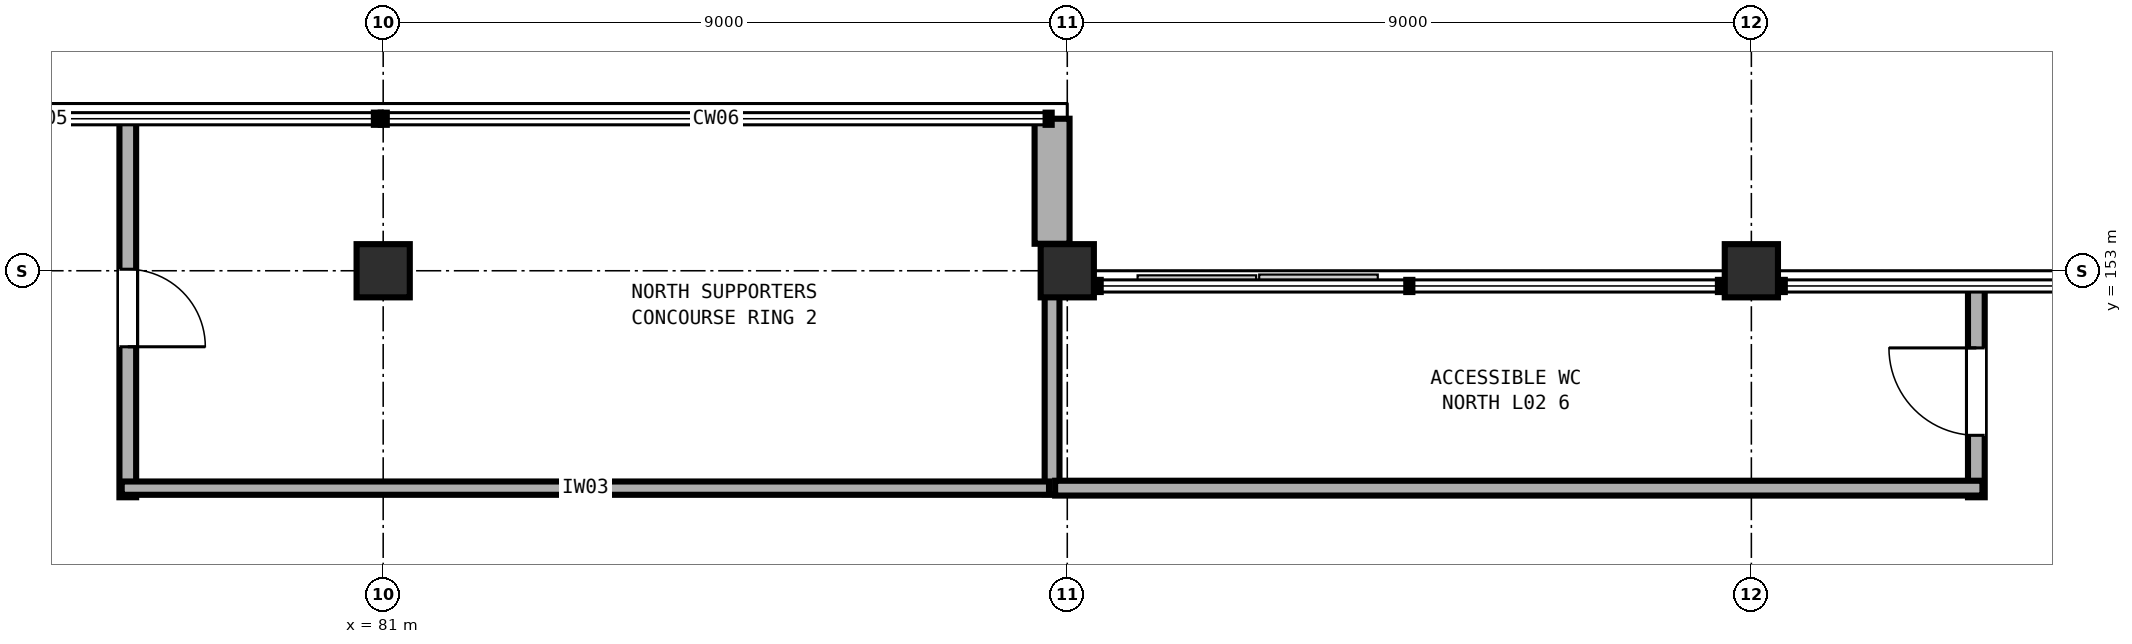
"""IFC4 building model, lengths in metres.
Left out: names, types, materials, properties, quantities, classifications, styles, units other than length and angle.
Written with IfcOpenShell. Run it as: python <this file> out.ifc"""

import sys

from ifc_helpers import new_model, si_unit, direction, frame, frame_2d, origin, origin_2d, place, context, subcontext, project, spatial, rectangle, extrude, element, fill, save


model = new_model("IFC4")
c1 = context("Model", 3, precision=1e-05, world=origin(), true_north=direction((0.0, 1.0)))
c2 = subcontext(c1, "Body", "Model", "MODEL_VIEW")
j1 = project(units=[si_unit("LENGTHUNIT", "METRE"), si_unit("PLANEANGLEUNIT", "RADIAN")], contexts=[c1])
p1 = place(None, origin())
s1 = spatial("IfcSite", under=j1, at=p1, CompositionType="ELEMENT")
p2 = place(p1, origin())
s2 = spatial("IfcBuilding", under=s1, at=p2, CompositionType="ELEMENT")
p3 = place(p2, frame((0.0, 0.0, 9.6)))
s3 = spatial("IfcBuildingStorey", under=s2, at=p3, CompositionType="ELEMENT", Elevation=9.6)
for number, where, z_axis, x_axis in (
    (1, (81.0, 153.0, 0.0), (0.0, 0.0, 1.0), (1.0, 0.0, 0.0)),
    (2, (90.0, 153.0, 0.0), (0.0, 0.0, 1.0), (1.0, 0.0, 0.0)),
    (3, (99.0, 153.0, 0.0), (0.0, 0.0, 1.0), (1.0, 0.0, 0.0)),
):
    element("IfcColumn", number, at=place(p3, frame(where, z_axis=z_axis, x_axis=x_axis)), inside=s3, PredefinedType="COLUMN", context=c2, shape_type="SweptSolid", body=[
        extrude(rectangle(XDim=0.7, YDim=0.7, at=origin_2d()), origin(), (0.0, 0.0, 1.0), 4.8),
    ])
p4 = place(p3, frame((89.8, 155.0, 0.0), z_axis=(0.0, 0.0, 1.0), x_axis=(0.0, -1.0, 0.0)))
e4 = element("IfcWall", 4, at=p4, inside=s3, PredefinedType="SOLIDWALL", context=c2, shape_type="SweptSolid", body=[
    extrude(rectangle(XDim=1.645, YDim=0.46, at=frame_2d((0.823, 0.0))), origin(), (0.0, 0.0, 1.0), 3.58),
])
p5 = place(p3, frame((77.64, 155.0, 0.0), z_axis=(0.0, 0.0, 1.0), x_axis=(0.0, -1.0, 0.0)))
e5 = element("IfcWall", 5, at=p5, inside=s3, PredefinedType="PARTITIONING", context=c2, shape_type="SweptSolid", body=[
    extrude(rectangle(XDim=4.98, YDim=0.22, at=frame_2d((2.49, 0.0))), origin(), (0.0, 0.0, 1.0), 3.56),
])
p6 = place(p5, frame((1.98, 0.0, 0.0)))
e6 = element("IfcOpeningElement", 6, at=p6, cuts=e5, PredefinedType="OPENING", context=c2, shape_type="SweptSolid", body=[
    extrude(rectangle(XDim=1.02, YDim=2.16, at=frame_2d((0.51, 1.08))), frame((0.0, 0.12, 0.0), z_axis=(0.0, -1.0, 0.0), x_axis=(1.0, 0.0, 0.0)), (0.0, 0.0, 1.0), 0.24),
])
p7 = place(p3, frame((89.8, 153.08, 0.0), z_axis=(0.0, 0.0, 1.0), x_axis=(0.0, -1.0, 0.0)))
e7 = element("IfcWall", 7, at=p7, inside=s3, PredefinedType="PARTITIONING", context=c2, shape_type="SweptSolid", body=[
    extrude(rectangle(XDim=3.02, YDim=0.195, at=frame_2d((1.51, 0.0))), origin(), (0.0, 0.0, 1.0), 3.56),
])
p8 = place(p3, frame((89.76, 150.14, 0.0), z_axis=(0.0, 0.0, 1.0), x_axis=(-1.0, 0.0, 0.0)))
e8 = element("IfcWall", 8, at=p8, inside=s3, PredefinedType="PARTITIONING", context=c2, shape_type="SweptSolid", body=[
    extrude(rectangle(XDim=12.2, YDim=0.175, at=frame_2d((6.1, 0.0))), origin(), (0.0, 0.0, 1.0), 3.56),
])
p9 = place(p3, frame((101.96, 150.02, 0.0), z_axis=(0.0, 0.0, 1.0), x_axis=(0.0, 1.0, 0.0)))
e9 = element("IfcWall", 9, at=p9, inside=s3, PredefinedType="PARTITIONING", context=c2, shape_type="SweptSolid", body=[
    extrude(rectangle(XDim=2.78, YDim=0.22, at=frame_2d((1.39, 0.0))), origin(), (0.0, 0.0, 1.0), 3.56),
])
p10 = place(p9, frame((0.815, 0.0, 0.0)))
e10 = element("IfcOpeningElement", 10, at=p10, cuts=e9, PredefinedType="OPENING", context=c2, shape_type="SweptSolid", body=[
    extrude(rectangle(XDim=1.15, YDim=2.15, at=frame_2d((0.575, 1.075))), frame((0.0, 0.12, 0.0), z_axis=(0.0, -1.0, 0.0), x_axis=(1.0, 0.0, 0.0)), (0.0, 0.0, 1.0), 0.24),
])
p11 = place(p3, frame((102.04, 150.14, 0.0), z_axis=(0.0, 0.0, 1.0), x_axis=(-1.0, 0.0, 0.0)))
e11 = element("IfcWall", 11, at=p11, inside=s3, PredefinedType="PARTITIONING", context=c2, shape_type="SweptSolid", body=[
    extrude(rectangle(XDim=12.2, YDim=0.195, at=frame_2d((6.1, 0.0))), origin(), (0.0, 0.0, 1.0), 3.56),
])
p12 = place(p6, origin())
e12 = element("IfcDoor", 12, at=p12, inside=s3, OperationType="SINGLE_SWING_RIGHT", PredefinedType="DOOR", context=c2, shape_type="SweptSolid", body=[
    extrude(rectangle(XDim=1.02, YDim=2.16, at=frame_2d((0.51, 1.08))), frame((0.0, 0.025, 0.0), z_axis=(0.0, -1.0, 0.0), x_axis=(1.0, 0.0, 0.0)), (0.0, 0.0, 1.0), 0.05),
])
fill(e6, e12)
p13 = place(p10, origin())
e13 = element("IfcDoor", 13, at=p13, inside=s3, OperationType="SINGLE_SWING_RIGHT", PredefinedType="DOOR", context=c2, shape_type="SweptSolid", body=[
    extrude(rectangle(XDim=1.15, YDim=2.15, at=frame_2d((0.575, 1.075))), frame((0.0, 0.025, 0.0), z_axis=(0.0, -1.0, 0.0), x_axis=(1.0, 0.0, 0.0)), (0.0, 0.0, 1.0), 0.05),
])
fill(e10, e13)
save(model, sys.argv[1])
